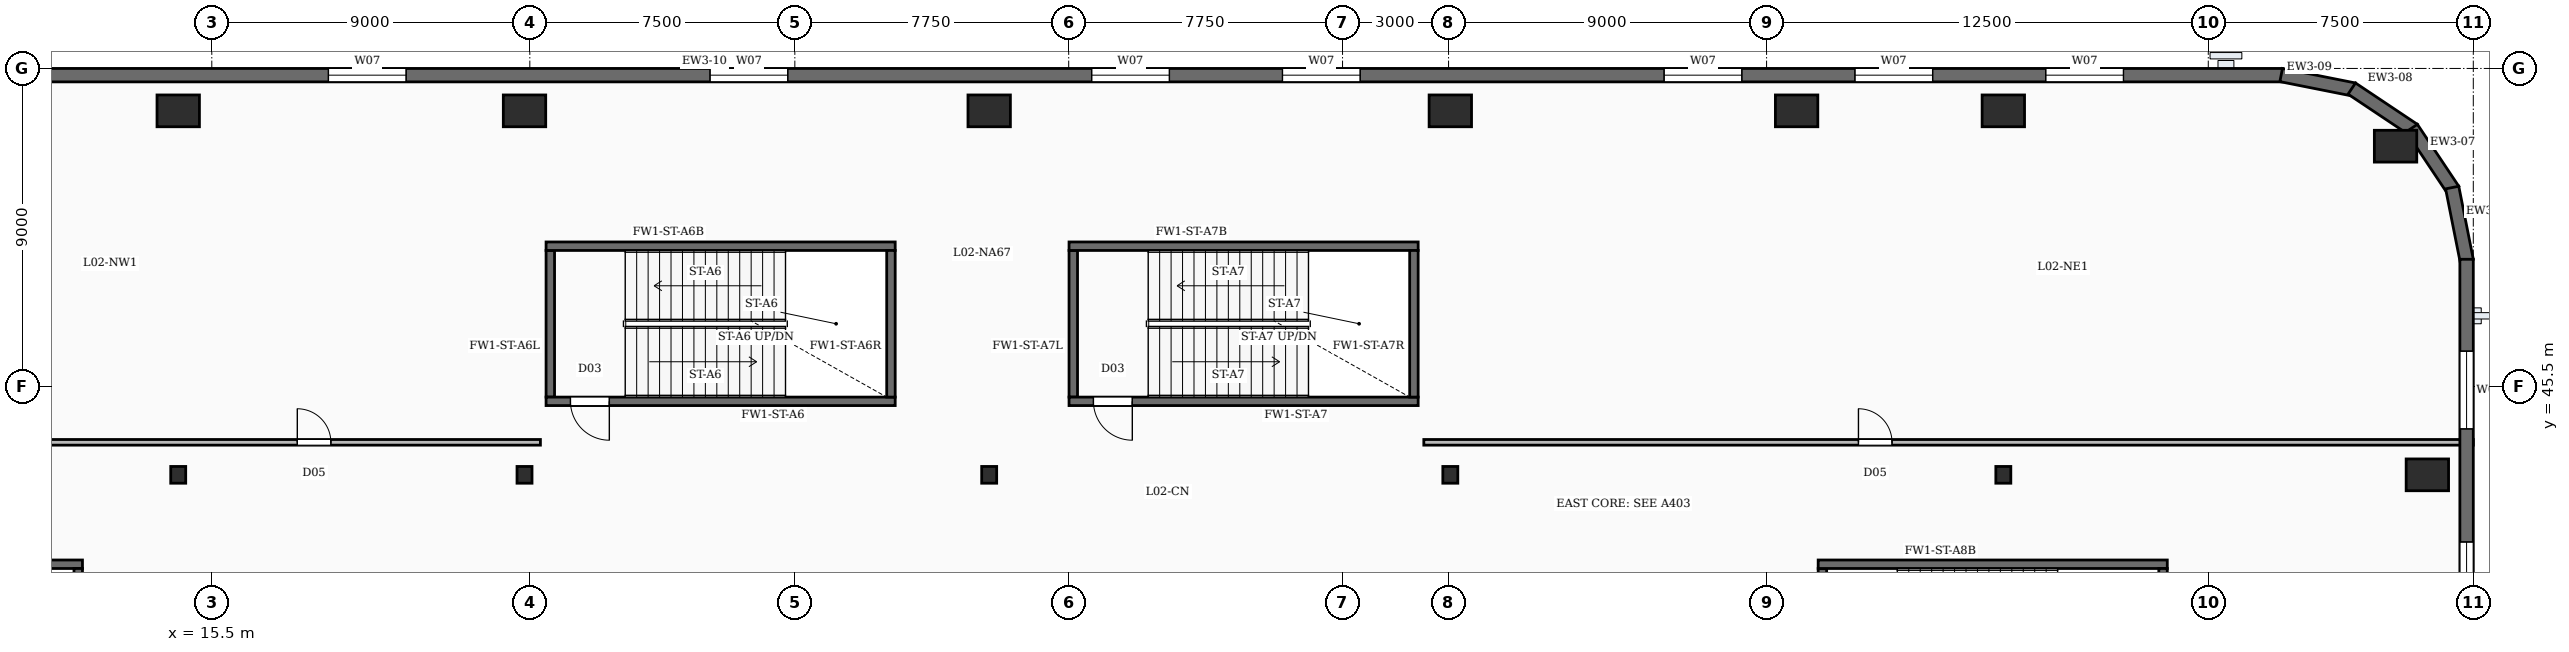
"""IFC4 building model, lengths in metres.
Left out: names, types, materials, properties, quantities, classifications, styles, units other than length and angle.
Written with IfcOpenShell. Run it as: python <this file> out.ifc"""

import sys

from ifc_helpers import new_model, si_unit, direction, frame, frame_2d, origin, origin_2d, place, context, subcontext, project, spatial, rectangle, i_section, extrude, element, fill, save


model = new_model("IFC4")
c1 = context("Model", 3, precision=1e-05, world=origin(), true_north=direction((0.0, 1.0)))
c2 = subcontext(c1, "Body", "Model", "MODEL_VIEW")
j1 = project(units=[si_unit("LENGTHUNIT", "METRE"), si_unit("PLANEANGLEUNIT", "RADIAN")], contexts=[c1])
p1 = place(None, origin())
s1 = spatial("IfcSite", under=j1, at=p1, CompositionType="ELEMENT")
p2 = place(p1, origin())
s2 = spatial("IfcBuilding", under=s1, at=p2, CompositionType="ELEMENT")
p3 = place(p2, frame((0.0, 0.0, 13.0)))
s3 = spatial("IfcBuildingStorey", under=s2, at=p3, CompositionType="ELEMENT", Elevation=13.0)
for number, where, z_axis, x_axis in (
    (1, (78.2, 43.0, -0.35), (0.0, 0.0, 1.0), (1.0, 0.0, 0.0)),
    (2, (77.3, 52.3, -0.35), (0.0, 0.0, 1.0), (1.0, 0.0, 0.0)),
    (3, (66.2, 53.3, -0.35), (0.0, 0.0, 1.0), (1.0, 0.0, 0.0)),
    (4, (60.35, 53.3, -0.35), (0.0, 0.0, 1.0), (1.0, 0.0, 0.0)),
    (5, (50.55, 53.3, -0.35), (0.0, 0.0, 1.0), (1.0, 0.0, 0.0)),
    (6, (37.5, 53.3, -0.35), (0.0, 0.0, 1.0), (1.0, 0.0, 0.0)),
    (7, (24.35, 53.3, -0.35), (0.0, 0.0, 1.0), (1.0, 0.0, 0.0)),
    (8, (14.55, 53.3, -0.35), (0.0, 0.0, 1.0), (1.0, 0.0, 0.0)),
):
    element("IfcColumn", number, at=place(p3, frame(where, z_axis=z_axis, x_axis=x_axis)), inside=s3, PredefinedType="COLUMN", context=c2, shape_type="SweptSolid", body=[
        extrude(rectangle(XDim=1.2, YDim=0.9, at=origin_2d()), origin(), (0.0, 0.0, 1.0), 5.0),
    ])
for number, where, z_axis, x_axis in (
    (9, (14.55, 43.0, -0.35), (0.0, 0.0, 1.0), (1.0, 0.0, 0.0)),
    (10, (24.35, 43.0, -0.35), (0.0, 0.0, 1.0), (1.0, 0.0, 0.0)),
    (11, (37.5, 43.0, -0.35), (0.0, 0.0, 1.0), (1.0, 0.0, 0.0)),
    (12, (50.55, 43.0, -0.35), (0.0, 0.0, 1.0), (1.0, 0.0, 0.0)),
    (13, (66.2, 43.0, -0.35), (0.0, 0.0, 1.0), (1.0, 0.0, 0.0)),
):
    element("IfcColumn", number, at=place(p3, frame(where, z_axis=z_axis, x_axis=x_axis)), inside=s3, PredefinedType="COLUMN", context=c2, shape_type="SweptSolid", body=[
        extrude(i_section(OverallWidth=0.424, OverallDepth=0.474, WebThickness=0.048, FlangeThickness=0.077, FilletRadius=0.02, at=origin_2d()), origin(), (0.0, 0.0, 1.0), 5.0),
    ])
p4 = place(p3, frame((79.31, 49.1, 0.0), z_axis=(0.0, 0.0, 1.0), x_axis=(0.0, -1.0, 0.0)))
e14 = element("IfcWall", 14, at=p4, inside=s3, PredefinedType="SOLIDWALL", context=c2, shape_type="SweptSolid", body=[
    extrude(rectangle(XDim=43.7, YDim=0.38, at=frame_2d((21.85, 0.0))), origin(), (0.0, 0.0, 1.0), 4.65),
])
p5 = place(p4, frame((2.6, 0.0, 0.95)))
e15 = element("IfcOpeningElement", 15, at=p5, cuts=e14, PredefinedType="OPENING", context=c2, shape_type="SweptSolid", body=[
    extrude(rectangle(XDim=2.2, YDim=2.5, at=frame_2d((1.1, 1.25))), frame((0.0, 0.2, 0.0), z_axis=(0.0, -1.0, 0.0), x_axis=(1.0, 0.0, 0.0)), (0.0, 0.0, 1.0), 0.4),
])
p6 = place(p4, frame((8.0, 0.0, 0.95)))
e16 = element("IfcOpeningElement", 16, at=p6, cuts=e14, PredefinedType="OPENING", context=c2, shape_type="SweptSolid", body=[
    extrude(rectangle(XDim=2.2, YDim=2.5, at=frame_2d((1.1, 1.25))), frame((0.0, 0.2, 0.0), z_axis=(0.0, -1.0, 0.0), x_axis=(1.0, 0.0, 0.0)), (0.0, 0.0, 1.0), 0.4),
])
p7 = place(p4, frame((18.8, 0.0, 0.95)))
e17 = element("IfcOpeningElement", 17, at=p7, cuts=e14, PredefinedType="OPENING", context=c2, shape_type="SweptSolid", body=[
    extrude(rectangle(XDim=2.2, YDim=2.5, at=frame_2d((1.1, 1.25))), frame((0.0, 0.2, 0.0), z_axis=(0.0, -1.0, 0.0), x_axis=(1.0, 0.0, 0.0)), (0.0, 0.0, 1.0), 0.4),
])
p8 = place(p4, frame((24.2, 0.0, 0.95)))
e18 = element("IfcOpeningElement", 18, at=p8, cuts=e14, PredefinedType="OPENING", context=c2, shape_type="SweptSolid", body=[
    extrude(rectangle(XDim=2.2, YDim=2.5, at=frame_2d((1.1, 1.25))), frame((0.0, 0.2, 0.0), z_axis=(0.0, -1.0, 0.0), x_axis=(1.0, 0.0, 0.0)), (0.0, 0.0, 1.0), 0.4),
])
p9 = place(p4, frame((29.6, 0.0, 0.95)))
e19 = element("IfcOpeningElement", 19, at=p9, cuts=e14, PredefinedType="OPENING", context=c2, shape_type="SweptSolid", body=[
    extrude(rectangle(XDim=2.2, YDim=2.5, at=frame_2d((1.1, 1.25))), frame((0.0, 0.2, 0.0), z_axis=(0.0, -1.0, 0.0), x_axis=(1.0, 0.0, 0.0)), (0.0, 0.0, 1.0), 0.4),
])
for number, where, z_axis, x_axis in (
    (20, (78.903, 51.129, 0.0), (0.0, 0.0, 1.0), (0.195, -0.981, 0.0)),
    (21, (77.76, 52.813, 0.0), (0.0, 0.0, 1.0), (0.556, -0.832, 0.0)),
    (22, (76.061, 53.931, 0.0), (0.0, 0.0, 1.0), (0.832, -0.556, 0.0)),
    (23, (74.063, 54.314, 0.0), (0.0, 0.0, 1.0), (0.981, -0.195, 0.0)),
):
    element("IfcWall", number, at=place(p3, frame(where, z_axis=z_axis, x_axis=x_axis)), inside=s3, PredefinedType="SOLIDWALL", context=c2, shape_type="SweptSolid", body=[
        extrude(rectangle(XDim=2.107, YDim=0.38, at=frame_2d((1.053, 0.0))), origin(), (0.0, 0.0, 1.0), 4.65),
    ])
p10 = place(p3, frame((5.4, 54.31, 0.0), z_axis=(0.0, 0.0, 1.0), x_axis=(1.0, 0.0, 0.0)))
e24 = element("IfcWall", 24, at=p10, inside=s3, PredefinedType="SOLIDWALL", context=c2, shape_type="SweptSolid", body=[
    extrude(rectangle(XDim=68.7, YDim=0.38, at=frame_2d((34.35, 0.0))), origin(), (0.0, 0.0, 1.0), 4.65),
])
p11 = place(p10, frame((13.4, 0.0, 0.95)))
e25 = element("IfcOpeningElement", 25, at=p11, cuts=e24, PredefinedType="OPENING", context=c2, shape_type="SweptSolid", body=[
    extrude(rectangle(XDim=2.2, YDim=2.5, at=frame_2d((1.1, 1.25))), frame((0.0, 0.2, 0.0), z_axis=(0.0, -1.0, 0.0), x_axis=(1.0, 0.0, 0.0)), (0.0, 0.0, 1.0), 0.4),
])
p12 = place(p10, frame((24.2, 0.0, 0.95)))
e26 = element("IfcOpeningElement", 26, at=p12, cuts=e24, PredefinedType="OPENING", context=c2, shape_type="SweptSolid", body=[
    extrude(rectangle(XDim=2.2, YDim=2.5, at=frame_2d((1.1, 1.25))), frame((0.0, 0.2, 0.0), z_axis=(0.0, -1.0, 0.0), x_axis=(1.0, 0.0, 0.0)), (0.0, 0.0, 1.0), 0.4),
])
p13 = place(p10, frame((35.0, 0.0, 0.95)))
e27 = element("IfcOpeningElement", 27, at=p13, cuts=e24, PredefinedType="OPENING", context=c2, shape_type="SweptSolid", body=[
    extrude(rectangle(XDim=2.2, YDim=2.5, at=frame_2d((1.1, 1.25))), frame((0.0, 0.2, 0.0), z_axis=(0.0, -1.0, 0.0), x_axis=(1.0, 0.0, 0.0)), (0.0, 0.0, 1.0), 0.4),
])
p14 = place(p10, frame((40.4, 0.0, 0.95)))
e28 = element("IfcOpeningElement", 28, at=p14, cuts=e24, PredefinedType="OPENING", context=c2, shape_type="SweptSolid", body=[
    extrude(rectangle(XDim=2.2, YDim=2.5, at=frame_2d((1.1, 1.25))), frame((0.0, 0.2, 0.0), z_axis=(0.0, -1.0, 0.0), x_axis=(1.0, 0.0, 0.0)), (0.0, 0.0, 1.0), 0.4),
])
p15 = place(p10, frame((51.2, 0.0, 0.95)))
e29 = element("IfcOpeningElement", 29, at=p15, cuts=e24, PredefinedType="OPENING", context=c2, shape_type="SweptSolid", body=[
    extrude(rectangle(XDim=2.2, YDim=2.5, at=frame_2d((1.1, 1.25))), frame((0.0, 0.2, 0.0), z_axis=(0.0, -1.0, 0.0), x_axis=(1.0, 0.0, 0.0)), (0.0, 0.0, 1.0), 0.4),
])
p16 = place(p10, frame((56.6, 0.0, 0.95)))
e30 = element("IfcOpeningElement", 30, at=p16, cuts=e24, PredefinedType="OPENING", context=c2, shape_type="SweptSolid", body=[
    extrude(rectangle(XDim=2.2, YDim=2.5, at=frame_2d((1.1, 1.25))), frame((0.0, 0.2, 0.0), z_axis=(0.0, -1.0, 0.0), x_axis=(1.0, 0.0, 0.0)), (0.0, 0.0, 1.0), 0.4),
])
p17 = place(p10, frame((62.0, 0.0, 0.95)))
e31 = element("IfcOpeningElement", 31, at=p17, cuts=e24, PredefinedType="OPENING", context=c2, shape_type="SweptSolid", body=[
    extrude(rectangle(XDim=2.2, YDim=2.5, at=frame_2d((1.1, 1.25))), frame((0.0, 0.2, 0.0), z_axis=(0.0, -1.0, 0.0), x_axis=(1.0, 0.0, 0.0)), (0.0, 0.0, 1.0), 0.4),
])
p18 = place(p3, frame((1.96, 40.47, 0.0), z_axis=(0.0, 0.0, 1.0), x_axis=(1.0, 0.0, 0.0)))
e32 = element("IfcWall", 32, at=p18, inside=s3, PredefinedType="SOLIDWALL", context=c2, shape_type="SweptSolid", body=[
    extrude(rectangle(XDim=9.88, YDim=0.24, at=frame_2d((4.94, 0.0))), origin(), (0.0, 0.0, 1.0), 4.65),
])
p19 = place(p3, frame((11.72, 36.2, 0.0), z_axis=(0.0, 0.0, 1.0), x_axis=(0.0, 1.0, 0.0)))
e33 = element("IfcWall", 33, at=p19, inside=s3, PredefinedType="SOLIDWALL", context=c2, shape_type="SweptSolid", body=[
    extrude(rectangle(XDim=4.15, YDim=0.24, at=frame_2d((2.075, 0.0))), origin(), (0.0, 0.0, 1.0), 4.65),
])
p20 = place(p3, frame((34.84, 45.08, 0.0), z_axis=(0.0, 0.0, 1.0), x_axis=(-1.0, 0.0, 0.0)))
e34 = element("IfcWall", 34, at=p20, inside=s3, PredefinedType="SOLIDWALL", context=c2, shape_type="SweptSolid", body=[
    extrude(rectangle(XDim=9.88, YDim=0.24, at=frame_2d((4.94, 0.0))), origin(), (0.0, 0.0, 1.0), 4.65),
])
p21 = place(p20, frame((8.09, 0.0, 0.0)))
e35 = element("IfcOpeningElement", 35, at=p21, cuts=e34, PredefinedType="OPENING", context=c2, shape_type="SweptSolid", body=[
    extrude(rectangle(XDim=1.1, YDim=2.15, at=frame_2d((0.55, 1.075))), frame((0.0, 0.13, 0.0), z_axis=(0.0, -1.0, 0.0), x_axis=(1.0, 0.0, 0.0)), (0.0, 0.0, 1.0), 0.26),
])
p22 = place(p3, frame((24.96, 49.47, 0.0), z_axis=(0.0, 0.0, 1.0), x_axis=(1.0, 0.0, 0.0)))
e36 = element("IfcWall", 36, at=p22, inside=s3, PredefinedType="SOLIDWALL", context=c2, shape_type="SweptSolid", body=[
    extrude(rectangle(XDim=9.88, YDim=0.24, at=frame_2d((4.94, 0.0))), origin(), (0.0, 0.0, 1.0), 4.65),
])
for number, where, z_axis, x_axis in (
    (37, (25.08, 45.2, 0.0), (0.0, 0.0, 1.0), (0.0, 1.0, 0.0)),
    (38, (34.72, 45.2, 0.0), (0.0, 0.0, 1.0), (0.0, 1.0, 0.0)),
):
    element("IfcWall", number, at=place(p3, frame(where, z_axis=z_axis, x_axis=x_axis)), inside=s3, PredefinedType="SOLIDWALL", context=c2, shape_type="SweptSolid", body=[
        extrude(rectangle(XDim=4.15, YDim=0.24, at=frame_2d((2.075, 0.0))), origin(), (0.0, 0.0, 1.0), 4.65),
    ])
p23 = place(p3, frame((49.64, 45.08, 0.0), z_axis=(0.0, 0.0, 1.0), x_axis=(-1.0, 0.0, 0.0)))
e39 = element("IfcWall", 39, at=p23, inside=s3, PredefinedType="SOLIDWALL", context=c2, shape_type="SweptSolid", body=[
    extrude(rectangle(XDim=9.88, YDim=0.24, at=frame_2d((4.94, 0.0))), origin(), (0.0, 0.0, 1.0), 4.65),
])
p24 = place(p23, frame((8.09, 0.0, 0.0)))
e40 = element("IfcOpeningElement", 40, at=p24, cuts=e39, PredefinedType="OPENING", context=c2, shape_type="SweptSolid", body=[
    extrude(rectangle(XDim=1.1, YDim=2.15, at=frame_2d((0.55, 1.075))), frame((0.0, 0.13, 0.0), z_axis=(0.0, -1.0, 0.0), x_axis=(1.0, 0.0, 0.0)), (0.0, 0.0, 1.0), 0.26),
])
p25 = place(p3, frame((39.76, 49.47, 0.0), z_axis=(0.0, 0.0, 1.0), x_axis=(1.0, 0.0, 0.0)))
e41 = element("IfcWall", 41, at=p25, inside=s3, PredefinedType="SOLIDWALL", context=c2, shape_type="SweptSolid", body=[
    extrude(rectangle(XDim=9.88, YDim=0.24, at=frame_2d((4.94, 0.0))), origin(), (0.0, 0.0, 1.0), 4.65),
])
for number, where, z_axis, x_axis in (
    (42, (39.88, 45.2, 0.0), (0.0, 0.0, 1.0), (0.0, 1.0, 0.0)),
    (43, (49.52, 45.2, 0.0), (0.0, 0.0, 1.0), (0.0, 1.0, 0.0)),
):
    element("IfcWall", number, at=place(p3, frame(where, z_axis=z_axis, x_axis=x_axis)), inside=s3, PredefinedType="SOLIDWALL", context=c2, shape_type="SweptSolid", body=[
        extrude(rectangle(XDim=4.15, YDim=0.24, at=frame_2d((2.075, 0.0))), origin(), (0.0, 0.0, 1.0), 4.65),
    ])
p26 = place(p3, frame((60.96, 40.47, 0.0), z_axis=(0.0, 0.0, 1.0), x_axis=(1.0, 0.0, 0.0)))
e44 = element("IfcWall", 44, at=p26, inside=s3, PredefinedType="SOLIDWALL", context=c2, shape_type="SweptSolid", body=[
    extrude(rectangle(XDim=9.88, YDim=0.24, at=frame_2d((4.94, 0.0))), origin(), (0.0, 0.0, 1.0), 4.65),
])
for number, where, z_axis, x_axis in (
    (45, (61.08, 36.2, 0.0), (0.0, 0.0, 1.0), (0.0, 1.0, 0.0)),
    (46, (70.72, 36.2, 0.0), (0.0, 0.0, 1.0), (0.0, 1.0, 0.0)),
):
    element("IfcWall", number, at=place(p3, frame(where, z_axis=z_axis, x_axis=x_axis)), inside=s3, PredefinedType="SOLIDWALL", context=c2, shape_type="SweptSolid", body=[
        extrude(rectangle(XDim=4.15, YDim=0.24, at=frame_2d((2.075, 0.0))), origin(), (0.0, 0.0, 1.0), 4.65),
    ])
p27 = place(p3, frame((0.0, 43.92, 0.0), z_axis=(0.0, 0.0, 1.0), x_axis=(1.0, 0.0, 0.0)))
e47 = element("IfcWall", 47, at=p27, inside=s3, PredefinedType="PARTITIONING", context=c2, shape_type="SweptSolid", body=[
    extrude(rectangle(XDim=24.8, YDim=0.16, at=frame_2d((12.4, 0.0))), origin(), (0.0, 0.0, 1.0), 3.71),
])
p28 = place(p27, frame((17.92, 0.0, 0.0)))
e48 = element("IfcOpeningElement", 48, at=p28, cuts=e47, PredefinedType="OPENING", context=c2, shape_type="SweptSolid", body=[
    extrude(rectangle(XDim=0.95, YDim=2.15, at=frame_2d((0.475, 1.075))), frame((0.0, 0.09, 0.0), z_axis=(0.0, -1.0, 0.0), x_axis=(1.0, 0.0, 0.0)), (0.0, 0.0, 1.0), 0.18),
])
p29 = place(p3, frame((49.8, 43.92, 0.0), z_axis=(0.0, 0.0, 1.0), x_axis=(1.0, 0.0, 0.0)))
e49 = element("IfcWall", 49, at=p29, inside=s3, PredefinedType="PARTITIONING", context=c2, shape_type="SweptSolid", body=[
    extrude(rectangle(XDim=29.7, YDim=0.16, at=frame_2d((14.85, 0.0))), origin(), (0.0, 0.0, 1.0), 3.71),
])
p30 = place(p29, frame((12.3, 0.0, 0.0)))
e50 = element("IfcOpeningElement", 50, at=p30, cuts=e49, PredefinedType="OPENING", context=c2, shape_type="SweptSolid", body=[
    extrude(rectangle(XDim=0.95, YDim=2.15, at=frame_2d((0.475, 1.075))), frame((0.0, 0.09, 0.0), z_axis=(0.0, -1.0, 0.0), x_axis=(1.0, 0.0, 0.0)), (0.0, 0.0, 1.0), 0.18),
])
p31 = place(p5, origin())
e51 = element("IfcWindow", 51, at=p31, inside=s3, PartitioningType="DOUBLE_PANEL_VERTICAL", PredefinedType="WINDOW", context=c2, shape_type="SweptSolid", body=[
    extrude(rectangle(XDim=2.2, YDim=2.5, at=frame_2d((1.1, 1.25))), frame((0.0, 0.03, 0.0), z_axis=(0.0, -1.0, 0.0), x_axis=(1.0, 0.0, 0.0)), (0.0, 0.0, 1.0), 0.06),
])
fill(e15, e51)
p32 = place(p6, origin())
e52 = element("IfcWindow", 52, at=p32, inside=s3, PartitioningType="DOUBLE_PANEL_VERTICAL", PredefinedType="WINDOW", context=c2, shape_type="SweptSolid", body=[
    extrude(rectangle(XDim=2.2, YDim=2.5, at=frame_2d((1.1, 1.25))), frame((0.0, 0.03, 0.0), z_axis=(0.0, -1.0, 0.0), x_axis=(1.0, 0.0, 0.0)), (0.0, 0.0, 1.0), 0.06),
])
fill(e16, e52)
p33 = place(p11, origin())
e53 = element("IfcWindow", 53, at=p33, inside=s3, PartitioningType="DOUBLE_PANEL_VERTICAL", PredefinedType="WINDOW", context=c2, shape_type="SweptSolid", body=[
    extrude(rectangle(XDim=2.2, YDim=2.5, at=frame_2d((1.1, 1.25))), frame((0.0, 0.03, 0.0), z_axis=(0.0, -1.0, 0.0), x_axis=(1.0, 0.0, 0.0)), (0.0, 0.0, 1.0), 0.06),
])
fill(e25, e53)
p34 = place(p12, origin())
e54 = element("IfcWindow", 54, at=p34, inside=s3, PartitioningType="DOUBLE_PANEL_VERTICAL", PredefinedType="WINDOW", context=c2, shape_type="SweptSolid", body=[
    extrude(rectangle(XDim=2.2, YDim=2.5, at=frame_2d((1.1, 1.25))), frame((0.0, 0.03, 0.0), z_axis=(0.0, -1.0, 0.0), x_axis=(1.0, 0.0, 0.0)), (0.0, 0.0, 1.0), 0.06),
])
fill(e26, e54)
p35 = place(p13, origin())
e55 = element("IfcWindow", 55, at=p35, inside=s3, PartitioningType="DOUBLE_PANEL_VERTICAL", PredefinedType="WINDOW", context=c2, shape_type="SweptSolid", body=[
    extrude(rectangle(XDim=2.2, YDim=2.5, at=frame_2d((1.1, 1.25))), frame((0.0, 0.03, 0.0), z_axis=(0.0, -1.0, 0.0), x_axis=(1.0, 0.0, 0.0)), (0.0, 0.0, 1.0), 0.06),
])
fill(e27, e55)
p36 = place(p14, origin())
e56 = element("IfcWindow", 56, at=p36, inside=s3, PartitioningType="DOUBLE_PANEL_VERTICAL", PredefinedType="WINDOW", context=c2, shape_type="SweptSolid", body=[
    extrude(rectangle(XDim=2.2, YDim=2.5, at=frame_2d((1.1, 1.25))), frame((0.0, 0.03, 0.0), z_axis=(0.0, -1.0, 0.0), x_axis=(1.0, 0.0, 0.0)), (0.0, 0.0, 1.0), 0.06),
])
fill(e28, e56)
p37 = place(p15, origin())
e57 = element("IfcWindow", 57, at=p37, inside=s3, PartitioningType="DOUBLE_PANEL_VERTICAL", PredefinedType="WINDOW", context=c2, shape_type="SweptSolid", body=[
    extrude(rectangle(XDim=2.2, YDim=2.5, at=frame_2d((1.1, 1.25))), frame((0.0, 0.03, 0.0), z_axis=(0.0, -1.0, 0.0), x_axis=(1.0, 0.0, 0.0)), (0.0, 0.0, 1.0), 0.06),
])
fill(e29, e57)
p38 = place(p16, origin())
e58 = element("IfcWindow", 58, at=p38, inside=s3, PartitioningType="DOUBLE_PANEL_VERTICAL", PredefinedType="WINDOW", context=c2, shape_type="SweptSolid", body=[
    extrude(rectangle(XDim=2.2, YDim=2.5, at=frame_2d((1.1, 1.25))), frame((0.0, 0.03, 0.0), z_axis=(0.0, -1.0, 0.0), x_axis=(1.0, 0.0, 0.0)), (0.0, 0.0, 1.0), 0.06),
])
fill(e30, e58)
p39 = place(p17, origin())
e59 = element("IfcWindow", 59, at=p39, inside=s3, PartitioningType="DOUBLE_PANEL_VERTICAL", PredefinedType="WINDOW", context=c2, shape_type="SweptSolid", body=[
    extrude(rectangle(XDim=2.2, YDim=2.5, at=frame_2d((1.1, 1.25))), frame((0.0, 0.03, 0.0), z_axis=(0.0, -1.0, 0.0), x_axis=(1.0, 0.0, 0.0)), (0.0, 0.0, 1.0), 0.06),
])
fill(e31, e59)
p40 = place(p21, origin())
e60 = element("IfcDoor", 60, at=p40, inside=s3, OperationType="SINGLE_SWING_LEFT", PredefinedType="DOOR", context=c2, shape_type="SweptSolid", body=[
    extrude(rectangle(XDim=1.1, YDim=2.15, at=frame_2d((0.55, 1.075))), frame((0.0, 0.025, 0.0), z_axis=(0.0, -1.0, 0.0), x_axis=(1.0, 0.0, 0.0)), (0.0, 0.0, 1.0), 0.05),
])
fill(e35, e60)
p41 = place(p24, origin())
e61 = element("IfcDoor", 61, at=p41, inside=s3, OperationType="SINGLE_SWING_LEFT", PredefinedType="DOOR", context=c2, shape_type="SweptSolid", body=[
    extrude(rectangle(XDim=1.1, YDim=2.15, at=frame_2d((0.55, 1.075))), frame((0.0, 0.025, 0.0), z_axis=(0.0, -1.0, 0.0), x_axis=(1.0, 0.0, 0.0)), (0.0, 0.0, 1.0), 0.05),
])
fill(e40, e61)
p42 = place(p28, origin())
e62 = element("IfcDoor", 62, at=p42, inside=s3, OperationType="SINGLE_SWING_LEFT", PredefinedType="DOOR", context=c2, shape_type="SweptSolid", body=[
    extrude(rectangle(XDim=0.95, YDim=2.15, at=frame_2d((0.475, 1.075))), frame((0.0, 0.025, 0.0), z_axis=(0.0, -1.0, 0.0), x_axis=(1.0, 0.0, 0.0)), (0.0, 0.0, 1.0), 0.05),
])
fill(e48, e62)
p43 = place(p30, origin())
e63 = element("IfcDoor", 63, at=p43, inside=s3, OperationType="SINGLE_SWING_LEFT", PredefinedType="DOOR", context=c2, shape_type="SweptSolid", body=[
    extrude(rectangle(XDim=0.95, YDim=2.15, at=frame_2d((0.475, 1.075))), frame((0.0, 0.025, 0.0), z_axis=(0.0, -1.0, 0.0), x_axis=(1.0, 0.0, 0.0)), (0.0, 0.0, 1.0), 0.05),
])
fill(e50, e63)
save(model, sys.argv[1])
